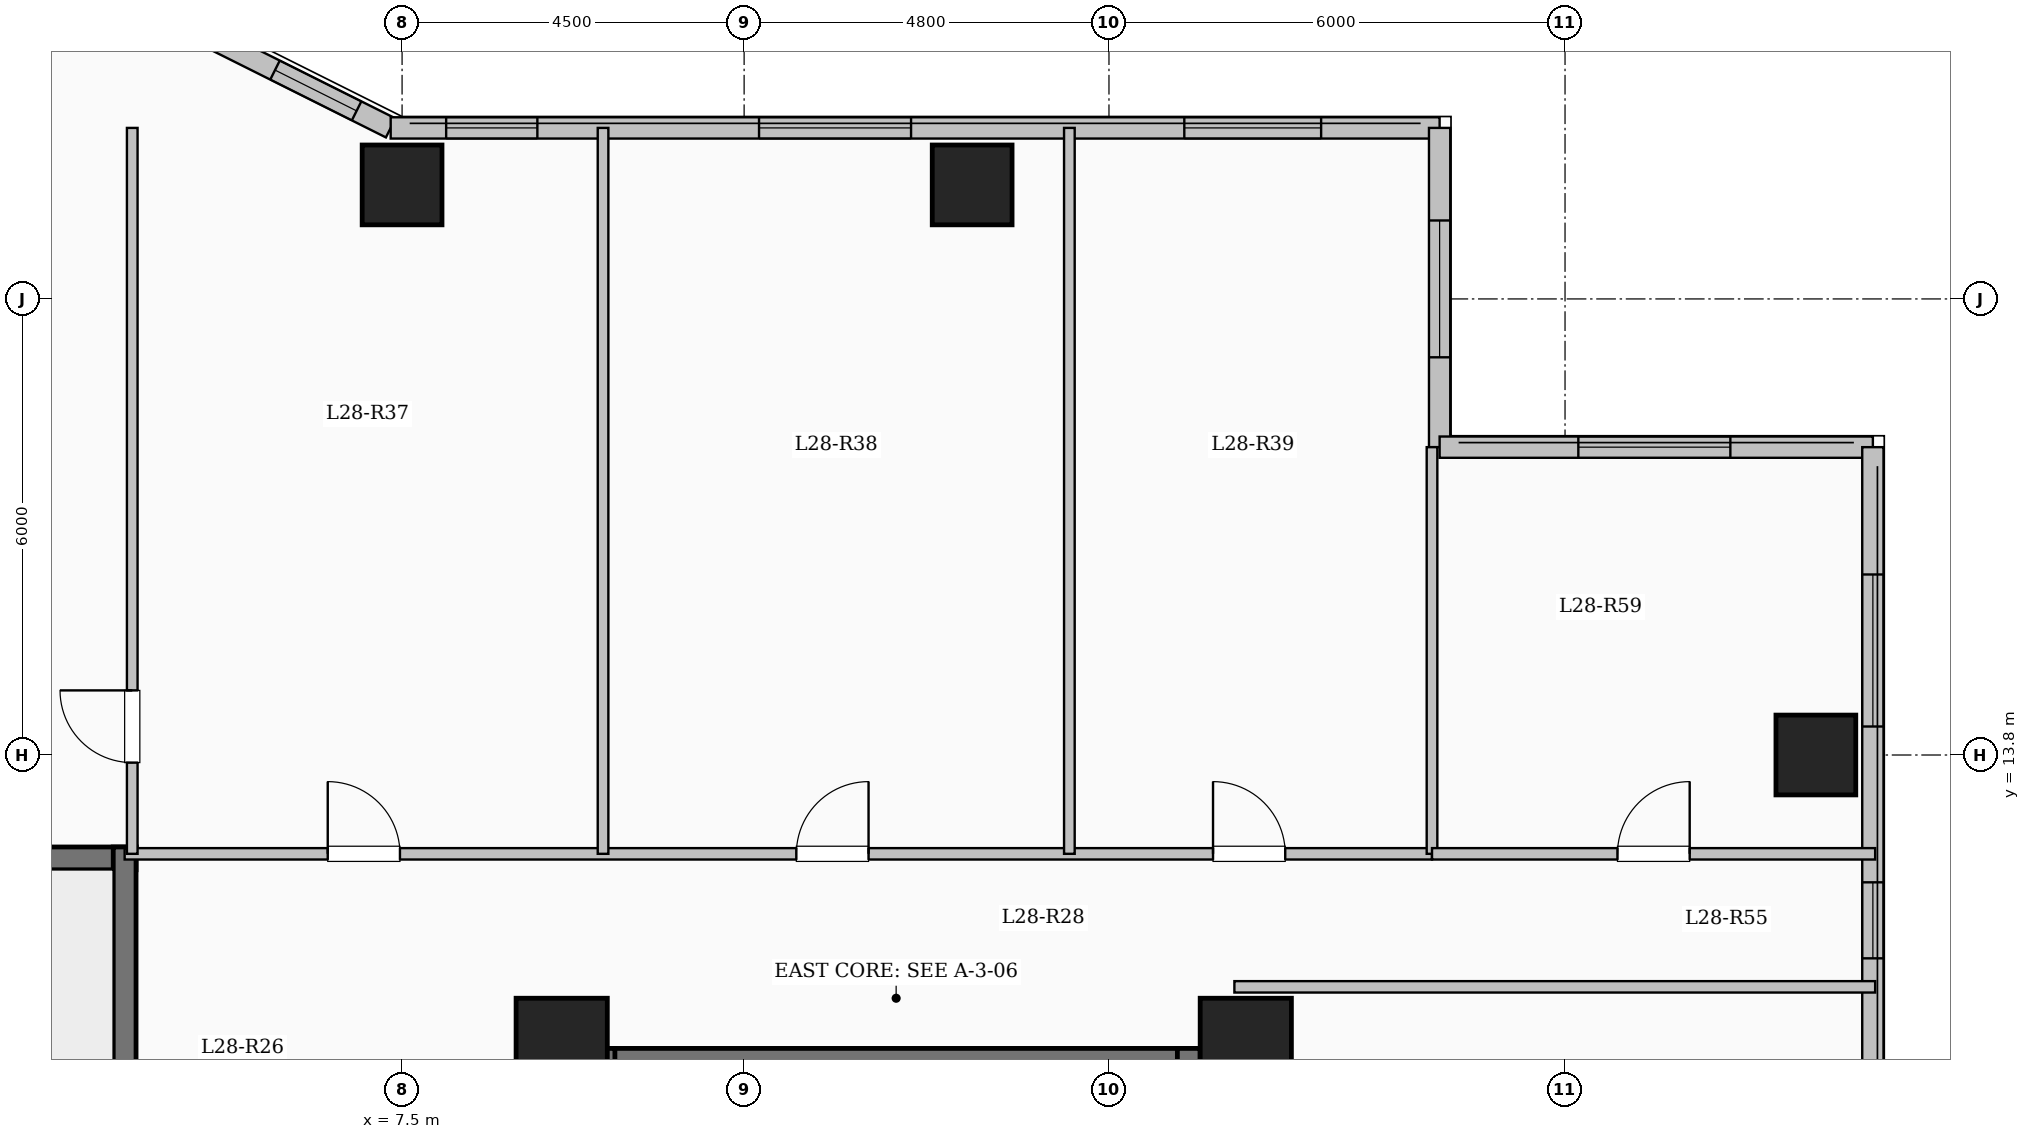
"""IFC4 building model, lengths in metres.
Left out: names, types, materials, properties, quantities, classifications, styles, units other than length and angle.
Written with IfcOpenShell. Run it as: python <this file> out.ifc"""

import sys

from ifc_helpers import new_model, si_unit, direction, frame, frame_2d, origin, origin_2d, place, context, subcontext, project, spatial, rectangle, extrude, element, fill, save


model = new_model("IFC4")
c1 = context("Model", 3, precision=1e-05, world=origin(), true_north=direction((0.0, 1.0)))
c2 = subcontext(c1, "Body", "Model", "MODEL_VIEW")
j1 = project(units=[si_unit("LENGTHUNIT", "METRE"), si_unit("PLANEANGLEUNIT", "RADIAN")], contexts=[c1])
p1 = place(None, origin())
s1 = spatial("IfcSite", under=j1, at=p1, CompositionType="ELEMENT")
p2 = place(p1, origin())
s2 = spatial("IfcBuilding", under=s1, at=p2, CompositionType="ELEMENT")
p3 = place(p2, frame((0.0, 0.0, 105.1)))
s3 = spatial("IfcBuildingStorey", under=s2, at=p3, CompositionType="ELEMENT", Elevation=105.1)
for number, where, z_axis, x_axis in (
    (1, (9.6, 10.0, 0.0), (0.0, 0.0, 1.0), (1.0, 0.0, 0.0)),
    (2, (18.6, 10.0, 0.0), (0.0, 0.0, 1.0), (1.0, 0.0, 0.0)),
):
    element("IfcColumn", number, at=place(p3, frame(where, z_axis=z_axis, x_axis=x_axis)), inside=s3, PredefinedType="COLUMN", context=c2, shape_type="SweptSolid", body=[
        extrude(rectangle(XDim=1.2, YDim=1.2, at=origin_2d()), origin(), (0.0, 0.0, 1.0), 3.35),
    ])
for number, where, z_axis, x_axis in (
    (3, (7.5, 21.3, 0.0), (0.0, 0.0, 1.0), (1.0, 0.0, 0.0)),
    (4, (15.0, 21.3, 0.0), (0.0, 0.0, 1.0), (1.0, 0.0, 0.0)),
    (5, (26.1, 13.8, 0.0), (0.0, 0.0, 1.0), (1.0, 0.0, 0.0)),
):
    element("IfcColumn", number, at=place(p3, frame(where, z_axis=z_axis, x_axis=x_axis)), inside=s3, PredefinedType="COLUMN", context=c2, shape_type="SweptSolid", body=[
        extrude(rectangle(XDim=1.05, YDim=1.05, at=origin_2d()), origin(), (0.0, 0.0, 1.0), 3.35),
    ])
p4 = place(p3, frame((4.35, 23.55, 0.0), z_axis=(0.0, 0.0, 1.0), x_axis=(0.894427191, -0.4472135955, 0.0)))
e6 = element("IfcWall", 6, at=p4, inside=s3, PredefinedType="SOLIDWALL", context=c2, shape_type="SweptSolid", body=[
    extrude(rectangle(XDim=3.354, YDim=0.28, at=frame_2d((1.677, 0.0))), origin(), (0.0, 0.0, 1.0), 3.1),
])
p5 = place(p4, frame((1.653, 0.0, 0.95)))
e7 = element("IfcOpeningElement", 7, at=p5, cuts=e6, PredefinedType="OPENING", context=c2, shape_type="SweptSolid", body=[
    extrude(rectangle(XDim=1.2, YDim=1.5, at=frame_2d((0.6, 0.75))), frame((0.0, 0.15, 0.0), z_axis=(0.0, -1.0, 0.0), x_axis=(1.0, 0.0, 0.0)), (0.0, 0.0, 1.0), 0.3),
])
p6 = place(p3, frame((7.35, 22.05, 0.0), z_axis=(0.0, 0.0, 1.0), x_axis=(1.0, 0.0, 0.0)))
e8 = element("IfcWall", 8, at=p6, inside=s3, PredefinedType="SOLIDWALL", context=c2, shape_type="SweptSolid", body=[
    extrude(rectangle(XDim=13.8, YDim=0.28, at=frame_2d((6.9, 0.0))), origin(), (0.0, 0.0, 1.0), 3.1),
])
p7 = place(p6, frame((0.73, 0.0, 0.95)))
e9 = element("IfcOpeningElement", 9, at=p7, cuts=e8, PredefinedType="OPENING", context=c2, shape_type="SweptSolid", body=[
    extrude(rectangle(XDim=1.2, YDim=1.5, at=frame_2d((0.6, 0.75))), frame((0.0, 0.15, 0.0), z_axis=(0.0, -1.0, 0.0), x_axis=(1.0, 0.0, 0.0)), (0.0, 0.0, 1.0), 0.3),
])
p8 = place(p6, frame((4.846, 0.0, 0.9)))
e10 = element("IfcOpeningElement", 10, at=p8, cuts=e8, PredefinedType="OPENING", context=c2, shape_type="SweptSolid", body=[
    extrude(rectangle(XDim=2.0, YDim=1.7, at=frame_2d((1.0, 0.85))), frame((0.0, 0.15, 0.0), z_axis=(0.0, -1.0, 0.0), x_axis=(1.0, 0.0, 0.0)), (0.0, 0.0, 1.0), 0.3),
])
p9 = place(p6, frame((10.441, 0.0, 0.9)))
e11 = element("IfcOpeningElement", 11, at=p9, cuts=e8, PredefinedType="OPENING", context=c2, shape_type="SweptSolid", body=[
    extrude(rectangle(XDim=1.8, YDim=1.65, at=frame_2d((0.9, 0.825))), frame((0.0, 0.15, 0.0), z_axis=(0.0, -1.0, 0.0), x_axis=(1.0, 0.0, 0.0)), (0.0, 0.0, 1.0), 0.3),
])
p10 = place(p3, frame((21.15, 22.05, 0.0), z_axis=(0.0, 0.0, 1.0), x_axis=(0.0, -1.0, 0.0)))
e12 = element("IfcWall", 12, at=p10, inside=s3, PredefinedType="SOLIDWALL", context=c2, shape_type="SweptSolid", body=[
    extrude(rectangle(XDim=4.2, YDim=0.28, at=frame_2d((2.1, 0.0))), origin(), (0.0, 0.0, 1.0), 3.1),
])
p11 = place(p10, frame((1.218, 0.0, 0.9)))
e13 = element("IfcOpeningElement", 13, at=p11, cuts=e12, PredefinedType="OPENING", context=c2, shape_type="SweptSolid", body=[
    extrude(rectangle(XDim=1.8, YDim=1.65, at=frame_2d((0.9, 0.825))), frame((0.0, 0.15, 0.0), z_axis=(0.0, -1.0, 0.0), x_axis=(1.0, 0.0, 0.0)), (0.0, 0.0, 1.0), 0.3),
])
p12 = place(p3, frame((21.15, 17.85, 0.0), z_axis=(0.0, 0.0, 1.0), x_axis=(1.0, 0.0, 0.0)))
e14 = element("IfcWall", 14, at=p12, inside=s3, PredefinedType="SOLIDWALL", context=c2, shape_type="SweptSolid", body=[
    extrude(rectangle(XDim=5.7, YDim=0.28, at=frame_2d((2.85, 0.0))), origin(), (0.0, 0.0, 1.0), 3.1),
])
p13 = place(p12, frame((1.825, 0.0, 0.9)))
e15 = element("IfcOpeningElement", 15, at=p13, cuts=e14, PredefinedType="OPENING", context=c2, shape_type="SweptSolid", body=[
    extrude(rectangle(XDim=2.0, YDim=1.7, at=frame_2d((1.0, 0.85))), frame((0.0, 0.15, 0.0), z_axis=(0.0, -1.0, 0.0), x_axis=(1.0, 0.0, 0.0)), (0.0, 0.0, 1.0), 0.3),
])
p14 = place(p3, frame((26.85, 17.85, 0.0), z_axis=(0.0, 0.0, 1.0), x_axis=(0.0, -1.0, 0.0)))
e16 = element("IfcWall", 16, at=p14, inside=s3, PredefinedType="SOLIDWALL", context=c2, shape_type="SweptSolid", body=[
    extrude(rectangle(XDim=35.7, YDim=0.28, at=frame_2d((17.85, 0.0))), origin(), (0.0, 0.0, 1.0), 3.1),
])
p15 = place(p14, frame((1.675, 0.0, 0.9)))
e17 = element("IfcOpeningElement", 17, at=p15, cuts=e16, PredefinedType="OPENING", context=c2, shape_type="SweptSolid", body=[
    extrude(rectangle(XDim=2.0, YDim=1.7, at=frame_2d((1.0, 0.85))), frame((0.0, 0.15, 0.0), z_axis=(0.0, -1.0, 0.0), x_axis=(1.0, 0.0, 0.0)), (0.0, 0.0, 1.0), 0.3),
])
p16 = place(p14, frame((5.725, 0.0, 0.95)))
e18 = element("IfcOpeningElement", 18, at=p16, cuts=e16, PredefinedType="OPENING", context=c2, shape_type="SweptSolid", body=[
    extrude(rectangle(XDim=1.0, YDim=1.5, at=frame_2d((0.5, 0.75))), frame((0.0, 0.15, 0.0), z_axis=(0.0, -1.0, 0.0), x_axis=(1.0, 0.0, 0.0)), (0.0, 0.0, 1.0), 0.3),
])
p17 = place(p14, frame((8.975, 0.0, 0.9)))
e19 = element("IfcOpeningElement", 19, at=p17, cuts=e16, PredefinedType="OPENING", context=c2, shape_type="SweptSolid", body=[
    extrude(rectangle(XDim=2.0, YDim=1.7, at=frame_2d((1.0, 0.85))), frame((0.0, 0.15, 0.0), z_axis=(0.0, -1.0, 0.0), x_axis=(1.0, 0.0, 0.0)), (0.0, 0.0, 1.0), 0.3),
])
p18 = place(p14, frame((13.725, 0.0, 0.9)))
e20 = element("IfcOpeningElement", 20, at=p18, cuts=e16, PredefinedType="OPENING", context=c2, shape_type="SweptSolid", body=[
    extrude(rectangle(XDim=1.8, YDim=1.65, at=frame_2d((0.9, 0.825))), frame((0.0, 0.15, 0.0), z_axis=(0.0, -1.0, 0.0), x_axis=(1.0, 0.0, 0.0)), (0.0, 0.0, 1.0), 0.3),
])
p19 = place(p14, frame((19.55, 0.0, 0.9)))
e21 = element("IfcOpeningElement", 21, at=p19, cuts=e16, PredefinedType="OPENING", context=c2, shape_type="SweptSolid", body=[
    extrude(rectangle(XDim=2.4, YDim=1.8, at=frame_2d((1.2, 0.9))), frame((0.0, 0.15, 0.0), z_axis=(0.0, -1.0, 0.0), x_axis=(1.0, 0.0, 0.0)), (0.0, 0.0, 1.0), 0.3),
])
p20 = place(p14, frame((25.857, 0.0, 0.9)))
e22 = element("IfcOpeningElement", 22, at=p20, cuts=e16, PredefinedType="OPENING", context=c2, shape_type="SweptSolid", body=[
    extrude(rectangle(XDim=1.5, YDim=1.65, at=frame_2d((0.75, 0.825))), frame((0.0, 0.15, 0.0), z_axis=(0.0, -1.0, 0.0), x_axis=(1.0, 0.0, 0.0)), (0.0, 0.0, 1.0), 0.3),
])
p21 = place(p14, frame((30.75, 0.0, 0.9)))
e23 = element("IfcOpeningElement", 23, at=p21, cuts=e16, PredefinedType="OPENING", context=c2, shape_type="SweptSolid", body=[
    extrude(rectangle(XDim=2.4, YDim=1.8, at=frame_2d((1.2, 0.9))), frame((0.0, 0.15, 0.0), z_axis=(0.0, -1.0, 0.0), x_axis=(1.0, 0.0, 0.0)), (0.0, 0.0, 1.0), 0.3),
])
p22 = place(p3, frame((10.0, 9.79, 0.0), z_axis=(0.0, 0.0, 1.0), x_axis=(1.0, 0.0, 0.0)))
e24 = element("IfcWall", 24, at=p22, inside=s3, PredefinedType="SHEAR", context=c2, shape_type="SweptSolid", body=[
    extrude(rectangle(XDim=8.0, YDim=0.3, at=frame_2d((4.0, 0.0))), origin(), (0.0, 0.0, 1.0), 3.35),
])
for number, where, z_axis, x_axis in (
    (25, (10.15, 6.35, 0.0), (0.0, 0.0, 1.0), (0.0, 1.0, 0.0)),
    (26, (17.85, 6.35, 0.0), (0.0, 0.0, 1.0), (0.0, 1.0, 0.0)),
):
    element("IfcWall", number, at=place(p3, frame(where, z_axis=z_axis, x_axis=x_axis)), inside=s3, PredefinedType="SHEAR", context=c2, shape_type="SweptSolid", body=[
        extrude(rectangle(XDim=3.59, YDim=0.3, at=frame_2d((1.795, 0.0))), origin(), (0.0, 0.0, 1.0), 3.35),
    ])
p23 = place(p3, frame((-4.0, 12.44, 0.0), z_axis=(0.0, 0.0, 1.0), x_axis=(1.0, 0.0, 0.0)))
e27 = element("IfcWall", 27, at=p23, inside=s3, PredefinedType="SHEAR", context=c2, shape_type="SweptSolid", body=[
    extrude(rectangle(XDim=8.0, YDim=0.3, at=frame_2d((4.0, 0.0))), origin(), (0.0, 0.0, 1.0), 3.35),
])
p24 = place(p3, frame((3.85, 9.0, 0.0), z_axis=(0.0, 0.0, 1.0), x_axis=(0.0, 1.0, 0.0)))
e28 = element("IfcWall", 28, at=p24, inside=s3, PredefinedType="SHEAR", context=c2, shape_type="SweptSolid", body=[
    extrude(rectangle(XDim=3.59, YDim=0.3, at=frame_2d((1.795, 0.0))), origin(), (0.0, 0.0, 1.0), 3.35),
])
p25 = place(p3, frame((3.85, 12.5, 0.0), z_axis=(0.0, 0.0, 1.0), x_axis=(1.0, 0.0, 0.0)))
e29 = element("IfcWall", 29, at=p25, inside=s3, PredefinedType="PARTITIONING", context=c2, shape_type="SweptSolid", body=[
    extrude(rectangle(XDim=17.2, YDim=0.15, at=frame_2d((8.6, 0.0))), origin(), (0.0, 0.0, 1.0), 3.1),
])
p26 = place(p25, frame((2.672, 0.0, 0.0)))
e30 = element("IfcOpeningElement", 30, at=p26, cuts=e29, PredefinedType="OPENING", context=c2, shape_type="SweptSolid", body=[
    extrude(rectangle(XDim=0.95, YDim=2.15, at=frame_2d((0.475, 1.075))), frame((0.0, 0.085, 0.0), z_axis=(0.0, -1.0, 0.0), x_axis=(1.0, 0.0, 0.0)), (0.0, 0.0, 1.0), 0.17),
])
p27 = place(p25, frame((8.837, 0.0, 0.0)))
e31 = element("IfcOpeningElement", 31, at=p27, cuts=e29, PredefinedType="OPENING", context=c2, shape_type="SweptSolid", body=[
    extrude(rectangle(XDim=0.95, YDim=2.15, at=frame_2d((0.475, 1.075))), frame((0.0, 0.085, 0.0), z_axis=(0.0, -1.0, 0.0), x_axis=(1.0, 0.0, 0.0)), (0.0, 0.0, 1.0), 0.17),
])
p28 = place(p25, frame((14.319, 0.0, 0.0)))
e32 = element("IfcOpeningElement", 32, at=p28, cuts=e29, PredefinedType="OPENING", context=c2, shape_type="SweptSolid", body=[
    extrude(rectangle(XDim=0.95, YDim=2.15, at=frame_2d((0.475, 1.075))), frame((0.0, 0.085, 0.0), z_axis=(0.0, -1.0, 0.0), x_axis=(1.0, 0.0, 0.0)), (0.0, 0.0, 1.0), 0.17),
])
p29 = place(p3, frame((3.95, 12.5, 0.0), z_axis=(0.0, 0.0, 1.0), x_axis=(0.0, 1.0, 0.0)))
e33 = element("IfcWall", 33, at=p29, inside=s3, PredefinedType="PARTITIONING", context=c2, shape_type="SweptSolid", body=[
    extrude(rectangle(XDim=9.55, YDim=0.14, at=frame_2d((4.775, 0.0))), origin(), (0.0, 0.0, 1.0), 3.1),
])
p30 = place(p29, frame((1.2, 0.0, 0.0)))
e34 = element("IfcOpeningElement", 34, at=p30, cuts=e33, PredefinedType="OPENING", context=c2, shape_type="SweptSolid", body=[
    extrude(rectangle(XDim=0.95, YDim=2.15, at=frame_2d((0.475, 1.075))), frame((0.0, 0.08, 0.0), z_axis=(0.0, -1.0, 0.0), x_axis=(1.0, 0.0, 0.0)), (0.0, 0.0, 1.0), 0.16),
])
for number, where, z_axis, x_axis in (
    (35, (10.144, 12.5, 0.0), (0.0, 0.0, 1.0), (0.0, 1.0, 0.0)),
    (36, (16.279, 12.5, 0.0), (0.0, 0.0, 1.0), (0.0, 1.0, 0.0)),
):
    element("IfcWall", number, at=place(p3, frame(where, z_axis=z_axis, x_axis=x_axis)), inside=s3, PredefinedType="PARTITIONING", context=c2, shape_type="SweptSolid", body=[
        extrude(rectangle(XDim=9.55, YDim=0.14, at=frame_2d((4.775, 0.0))), origin(), (0.0, 0.0, 1.0), 3.1),
    ])
p31 = place(p3, frame((18.45, 10.75, 0.0), z_axis=(0.0, 0.0, 1.0), x_axis=(1.0, 0.0, 0.0)))
e37 = element("IfcWall", 37, at=p31, inside=s3, PredefinedType="PARTITIONING", context=c2, shape_type="SweptSolid", body=[
    extrude(rectangle(XDim=8.43, YDim=0.15, at=frame_2d((4.215, 0.0))), origin(), (0.0, 0.0, 1.0), 3.1),
])
p32 = place(p3, frame((21.05, 12.5, 0.0), z_axis=(0.0, 0.0, 1.0), x_axis=(0.0, 1.0, 0.0)))
e38 = element("IfcWall", 38, at=p32, inside=s3, PredefinedType="PARTITIONING", context=c2, shape_type="SweptSolid", body=[
    extrude(rectangle(XDim=5.35, YDim=0.14, at=frame_2d((2.675, 0.0))), origin(), (0.0, 0.0, 1.0), 3.1),
])
p33 = place(p3, frame((21.05, 12.5, 0.0), z_axis=(0.0, 0.0, 1.0), x_axis=(1.0, 0.0, 0.0)))
e39 = element("IfcWall", 39, at=p33, inside=s3, PredefinedType="PARTITIONING", context=c2, shape_type="SweptSolid", body=[
    extrude(rectangle(XDim=5.83, YDim=0.15, at=frame_2d((2.915, 0.0))), origin(), (0.0, 0.0, 1.0), 3.1),
])
p34 = place(p33, frame((2.44, 0.0, 0.0)))
e40 = element("IfcOpeningElement", 40, at=p34, cuts=e39, PredefinedType="OPENING", context=c2, shape_type="SweptSolid", body=[
    extrude(rectangle(XDim=0.95, YDim=2.15, at=frame_2d((0.475, 1.075))), frame((0.0, 0.085, 0.0), z_axis=(0.0, -1.0, 0.0), x_axis=(1.0, 0.0, 0.0)), (0.0, 0.0, 1.0), 0.17),
])
p35 = place(p5, origin())
e41 = element("IfcWindow", 41, at=p35, inside=s3, PartitioningType="SINGLE_PANEL", PredefinedType="WINDOW", context=c2, shape_type="SweptSolid", body=[
    extrude(rectangle(XDim=1.2, YDim=1.5, at=frame_2d((0.6, 0.75))), frame((0.0, 0.03, 0.0), z_axis=(0.0, -1.0, 0.0), x_axis=(1.0, 0.0, 0.0)), (0.0, 0.0, 1.0), 0.06),
])
fill(e7, e41)
p36 = place(p7, origin())
e42 = element("IfcWindow", 42, at=p36, inside=s3, PartitioningType="SINGLE_PANEL", PredefinedType="WINDOW", context=c2, shape_type="SweptSolid", body=[
    extrude(rectangle(XDim=1.2, YDim=1.5, at=frame_2d((0.6, 0.75))), frame((0.0, 0.03, 0.0), z_axis=(0.0, -1.0, 0.0), x_axis=(1.0, 0.0, 0.0)), (0.0, 0.0, 1.0), 0.06),
])
fill(e9, e42)
p37 = place(p8, origin())
e43 = element("IfcWindow", 43, at=p37, inside=s3, PartitioningType="SINGLE_PANEL", PredefinedType="WINDOW", context=c2, shape_type="SweptSolid", body=[
    extrude(rectangle(XDim=2.0, YDim=1.7, at=frame_2d((1.0, 0.85))), frame((0.0, 0.03, 0.0), z_axis=(0.0, -1.0, 0.0), x_axis=(1.0, 0.0, 0.0)), (0.0, 0.0, 1.0), 0.06),
])
fill(e10, e43)
p38 = place(p9, origin())
e44 = element("IfcWindow", 44, at=p38, inside=s3, PartitioningType="SINGLE_PANEL", PredefinedType="WINDOW", context=c2, shape_type="SweptSolid", body=[
    extrude(rectangle(XDim=1.8, YDim=1.65, at=frame_2d((0.9, 0.825))), frame((0.0, 0.03, 0.0), z_axis=(0.0, -1.0, 0.0), x_axis=(1.0, 0.0, 0.0)), (0.0, 0.0, 1.0), 0.06),
])
fill(e11, e44)
p39 = place(p11, origin())
e45 = element("IfcWindow", 45, at=p39, inside=s3, PartitioningType="SINGLE_PANEL", PredefinedType="WINDOW", context=c2, shape_type="SweptSolid", body=[
    extrude(rectangle(XDim=1.8, YDim=1.65, at=frame_2d((0.9, 0.825))), frame((0.0, 0.03, 0.0), z_axis=(0.0, -1.0, 0.0), x_axis=(1.0, 0.0, 0.0)), (0.0, 0.0, 1.0), 0.06),
])
fill(e13, e45)
p40 = place(p13, origin())
e46 = element("IfcWindow", 46, at=p40, inside=s3, PartitioningType="SINGLE_PANEL", PredefinedType="WINDOW", context=c2, shape_type="SweptSolid", body=[
    extrude(rectangle(XDim=2.0, YDim=1.7, at=frame_2d((1.0, 0.85))), frame((0.0, 0.03, 0.0), z_axis=(0.0, -1.0, 0.0), x_axis=(1.0, 0.0, 0.0)), (0.0, 0.0, 1.0), 0.06),
])
fill(e15, e46)
p41 = place(p15, origin())
e47 = element("IfcWindow", 47, at=p41, inside=s3, PartitioningType="SINGLE_PANEL", PredefinedType="WINDOW", context=c2, shape_type="SweptSolid", body=[
    extrude(rectangle(XDim=2.0, YDim=1.7, at=frame_2d((1.0, 0.85))), frame((0.0, 0.03, 0.0), z_axis=(0.0, -1.0, 0.0), x_axis=(1.0, 0.0, 0.0)), (0.0, 0.0, 1.0), 0.06),
])
fill(e17, e47)
p42 = place(p16, origin())
e48 = element("IfcWindow", 48, at=p42, inside=s3, PartitioningType="SINGLE_PANEL", PredefinedType="WINDOW", context=c2, shape_type="SweptSolid", body=[
    extrude(rectangle(XDim=1.0, YDim=1.5, at=frame_2d((0.5, 0.75))), frame((0.0, 0.03, 0.0), z_axis=(0.0, -1.0, 0.0), x_axis=(1.0, 0.0, 0.0)), (0.0, 0.0, 1.0), 0.06),
])
fill(e18, e48)
p43 = place(p26, origin())
e49 = element("IfcDoor", 49, at=p43, inside=s3, OperationType="SINGLE_SWING_LEFT", PredefinedType="DOOR", context=c2, shape_type="SweptSolid", body=[
    extrude(rectangle(XDim=0.95, YDim=2.15, at=frame_2d((0.475, 1.075))), frame((0.0, 0.025, 0.0), z_axis=(0.0, -1.0, 0.0), x_axis=(1.0, 0.0, 0.0)), (0.0, 0.0, 1.0), 0.05),
])
fill(e30, e49)
p44 = place(p27, origin())
e50 = element("IfcDoor", 50, at=p44, inside=s3, OperationType="SINGLE_SWING_RIGHT", PredefinedType="DOOR", context=c2, shape_type="SweptSolid", body=[
    extrude(rectangle(XDim=0.95, YDim=2.15, at=frame_2d((0.475, 1.075))), frame((0.0, 0.025, 0.0), z_axis=(0.0, -1.0, 0.0), x_axis=(1.0, 0.0, 0.0)), (0.0, 0.0, 1.0), 0.05),
])
fill(e31, e50)
p45 = place(p28, origin())
e51 = element("IfcDoor", 51, at=p45, inside=s3, OperationType="SINGLE_SWING_LEFT", PredefinedType="DOOR", context=c2, shape_type="SweptSolid", body=[
    extrude(rectangle(XDim=0.95, YDim=2.15, at=frame_2d((0.475, 1.075))), frame((0.0, 0.025, 0.0), z_axis=(0.0, -1.0, 0.0), x_axis=(1.0, 0.0, 0.0)), (0.0, 0.0, 1.0), 0.05),
])
fill(e32, e51)
p46 = place(p30, origin())
e52 = element("IfcDoor", 52, at=p46, inside=s3, OperationType="SINGLE_SWING_RIGHT", PredefinedType="DOOR", context=c2, shape_type="SweptSolid", body=[
    extrude(rectangle(XDim=0.95, YDim=2.15, at=frame_2d((0.475, 1.075))), frame((0.0, 0.025, 0.0), z_axis=(0.0, -1.0, 0.0), x_axis=(1.0, 0.0, 0.0)), (0.0, 0.0, 1.0), 0.05),
])
fill(e34, e52)
p47 = place(p34, origin())
e53 = element("IfcDoor", 53, at=p47, inside=s3, OperationType="SINGLE_SWING_RIGHT", PredefinedType="DOOR", context=c2, shape_type="SweptSolid", body=[
    extrude(rectangle(XDim=0.95, YDim=2.15, at=frame_2d((0.475, 1.075))), frame((0.0, 0.025, 0.0), z_axis=(0.0, -1.0, 0.0), x_axis=(1.0, 0.0, 0.0)), (0.0, 0.0, 1.0), 0.05),
])
fill(e40, e53)
save(model, sys.argv[1])
